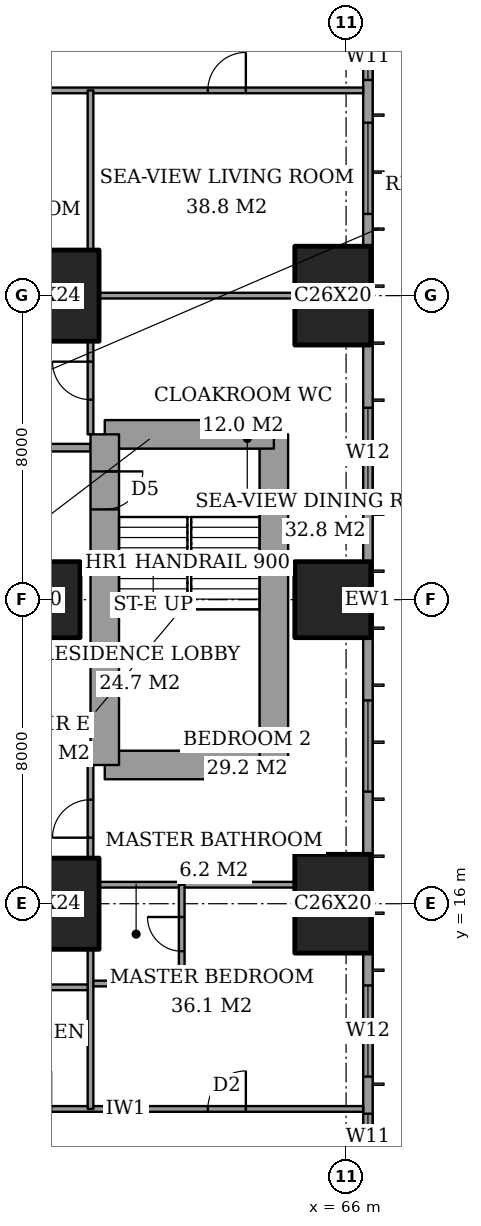
"""IFC4 building model, lengths in metres.
Left out: names, types, materials, properties, quantities, classifications, styles, units other than length and angle.
Written with IfcOpenShell. Run it as: python <this file> out.ifc"""

import sys

from ifc_helpers import new_model, si_unit, direction, frame, frame_2d, origin, origin_2d, place, context, subcontext, project, spatial, rectangle, extrude, element, fill, save


model = new_model("IFC4")
c1 = context("Model", 3, precision=1e-05, world=origin(), true_north=direction((0.0, 1.0)))
c2 = subcontext(c1, "Body", "Model", "MODEL_VIEW")
j1 = project(units=[si_unit("LENGTHUNIT", "METRE"), si_unit("PLANEANGLEUNIT", "RADIAN")], contexts=[c1])
p1 = place(None, origin())
s1 = spatial("IfcSite", under=j1, at=p1, CompositionType="ELEMENT")
p2 = place(p1, origin())
s2 = spatial("IfcBuilding", under=s1, at=p2, CompositionType="ELEMENT")
p3 = place(p2, frame((0.0, 0.0, 107.0)))
s3 = spatial("IfcBuildingStorey", under=s2, at=p3, CompositionType="ELEMENT", Elevation=107.0)
p4 = place(p3, frame((58.0, 16.0, 0.0), z_axis=(0.0, 0.0, 1.0), x_axis=(1.0, 0.0, 0.0)))
e1 = element("IfcColumn", 1, at=p4, inside=s3, PredefinedType="COLUMN", context=c2, shape_type="SweptSolid", body=[
    extrude(rectangle(XDim=3.0, YDim=2.4, at=origin_2d()), origin(), (0.0, 0.0, 1.0), 3.6),
])
p5 = place(p3, frame((58.0, 24.0, 0.0), z_axis=(0.0, 0.0, 1.0), x_axis=(1.0, 0.0, 0.0)))
e2 = element("IfcColumn", 2, at=p5, inside=s3, PredefinedType="COLUMN", context=c2, shape_type="SweptSolid", body=[
    extrude(rectangle(XDim=2.0, YDim=2.0, at=origin_2d()), origin(), (0.0, 0.0, 1.0), 3.6),
])
p6 = place(p3, frame((58.0, 32.0, 0.0), z_axis=(0.0, 0.0, 1.0), x_axis=(1.0, 0.0, 0.0)))
e3 = element("IfcColumn", 3, at=p6, inside=s3, PredefinedType="COLUMN", context=c2, shape_type="SweptSolid", body=[
    extrude(rectangle(XDim=3.0, YDim=2.4, at=origin_2d()), origin(), (0.0, 0.0, 1.0), 3.6),
])
p7 = place(p3, frame((65.65, 16.0, 0.0), z_axis=(0.0, 0.0, 1.0), x_axis=(0.0, 1.0, 0.0)))
e4 = element("IfcColumn", 4, at=p7, inside=s3, PredefinedType="COLUMN", context=c2, shape_type="SweptSolid", body=[
    extrude(rectangle(XDim=2.6, YDim=2.0, at=origin_2d()), origin(), (0.0, 0.0, 1.0), 3.6),
])
p8 = place(p3, frame((65.65, 24.0, 0.0), z_axis=(0.0, 0.0, 1.0), x_axis=(1.0, 0.0, 0.0)))
e5 = element("IfcColumn", 5, at=p8, inside=s3, PredefinedType="COLUMN", context=c2, shape_type="SweptSolid", body=[
    extrude(rectangle(XDim=2.0, YDim=2.0, at=origin_2d()), origin(), (0.0, 0.0, 1.0), 3.6),
])
p9 = place(p3, frame((65.65, 32.0, 0.0), z_axis=(0.0, 0.0, 1.0), x_axis=(0.0, 1.0, 0.0)))
e6 = element("IfcColumn", 6, at=p9, inside=s3, PredefinedType="COLUMN", context=c2, shape_type="SweptSolid", body=[
    extrude(rectangle(XDim=2.6, YDim=2.0, at=origin_2d()), origin(), (0.0, 0.0, 1.0), 3.6),
])
p10 = place(p3, frame((59.65, 19.65, 0.0), z_axis=(0.0, 0.0, 1.0), x_axis=(1.0, 0.0, 0.0)))
e7 = element("IfcWall", 7, at=p10, inside=s3, PredefinedType="SHEAR", context=c2, shape_type="SweptSolid", body=[
    extrude(rectangle(XDim=4.45, YDim=0.75, at=frame_2d((2.225, 0.0))), origin(), (0.0, 0.0, 1.0), 3.6),
])
p11 = place(p3, frame((64.1, 19.65, 0.0), z_axis=(0.0, 0.0, 1.0), x_axis=(0.0, 1.0, 0.0)))
e8 = element("IfcWall", 8, at=p11, inside=s3, PredefinedType="SHEAR", context=c2, shape_type="SweptSolid", body=[
    extrude(rectangle(XDim=8.7, YDim=0.75, at=frame_2d((4.35, 0.0))), origin(), (0.0, 0.0, 1.0), 3.6),
])
p12 = place(p3, frame((64.1, 28.35, 0.0), z_axis=(0.0, 0.0, 1.0), x_axis=(-1.0, 0.0, 0.0)))
e9 = element("IfcWall", 9, at=p12, inside=s3, PredefinedType="SHEAR", context=c2, shape_type="SweptSolid", body=[
    extrude(rectangle(XDim=4.45, YDim=0.75, at=frame_2d((2.225, 0.0))), origin(), (0.0, 0.0, 1.0), 3.6),
])
p13 = place(p3, frame((59.65, 28.35, 0.0), z_axis=(0.0, 0.0, 1.0), x_axis=(0.0, -1.0, 0.0)))
e10 = element("IfcWall", 10, at=p13, inside=s3, PredefinedType="SHEAR", context=c2, shape_type="SweptSolid", body=[
    extrude(rectangle(XDim=8.7, YDim=0.75, at=frame_2d((4.35, 0.0))), origin(), (0.0, 0.0, 1.0), 3.6),
])
p14 = place(p13, frame((0.975, 0.0, 0.0)))
e11 = element("IfcOpeningElement", 11, at=p14, cuts=e10, PredefinedType="OPENING", context=c2, shape_type="SweptSolid", body=[
    extrude(rectangle(XDim=1.0, YDim=2.1, at=frame_2d((0.5, 1.05))), frame((0.0, 0.385, 0.0), z_axis=(0.0, -1.0, 0.0), x_axis=(1.0, 0.0, 0.0)), (0.0, 0.0, 1.0), 0.77),
])
p15 = place(p3, frame((66.575, 3.175, 0.0), z_axis=(0.0, 0.0, 1.0), x_axis=(0.0, 1.0, 0.0)))
e12 = element("IfcWall", 12, at=p15, inside=s3, PredefinedType="SOLIDWALL", context=c2, shape_type="SweptSolid", body=[
    extrude(rectangle(XDim=41.65, YDim=0.25, at=frame_2d((20.825, 0.0))), origin(), (0.0, 0.0, 1.0), 3.6),
])
p16 = place(p15, frame((0.775, 0.0, 0.4)))
e13 = element("IfcOpeningElement", 13, at=p16, cuts=e12, PredefinedType="OPENING", context=c2, shape_type="SweptSolid", body=[
    extrude(rectangle(XDim=2.4, YDim=2.2, at=frame_2d((1.2, 1.1))), frame((0.0, 0.135, 0.0), z_axis=(0.0, -1.0, 0.0), x_axis=(1.0, 0.0, 0.0)), (0.0, 0.0, 1.0), 0.27),
])
p17 = place(p15, frame((6.1, 0.0, 0.4)))
e14 = element("IfcOpeningElement", 14, at=p17, cuts=e12, PredefinedType="OPENING", context=c2, shape_type="SweptSolid", body=[
    extrude(rectangle(XDim=1.2, YDim=2.2, at=frame_2d((0.6, 1.1))), frame((0.0, 0.135, 0.0), z_axis=(0.0, -1.0, 0.0), x_axis=(1.0, 0.0, 0.0)), (0.0, 0.0, 1.0), 0.27),
])
p18 = place(p15, frame((8.275, 0.0, 0.4)))
e15 = element("IfcOpeningElement", 15, at=p18, cuts=e12, PredefinedType="OPENING", context=c2, shape_type="SweptSolid", body=[
    extrude(rectangle(XDim=2.4, YDim=2.2, at=frame_2d((1.2, 1.1))), frame((0.0, 0.135, 0.0), z_axis=(0.0, -1.0, 0.0), x_axis=(1.0, 0.0, 0.0)), (0.0, 0.0, 1.0), 0.27),
])
p19 = place(p15, frame((15.775, 0.0, 0.4)))
e16 = element("IfcOpeningElement", 16, at=p19, cuts=e12, PredefinedType="OPENING", context=c2, shape_type="SweptSolid", body=[
    extrude(rectangle(XDim=2.4, YDim=2.2, at=frame_2d((1.2, 1.1))), frame((0.0, 0.135, 0.0), z_axis=(0.0, -1.0, 0.0), x_axis=(1.0, 0.0, 0.0)), (0.0, 0.0, 1.0), 0.27),
])
p20 = place(p15, frame((23.475, 0.0, 0.4)))
e17 = element("IfcOpeningElement", 17, at=p20, cuts=e12, PredefinedType="OPENING", context=c2, shape_type="SweptSolid", body=[
    extrude(rectangle(XDim=2.4, YDim=2.2, at=frame_2d((1.2, 1.1))), frame((0.0, 0.135, 0.0), z_axis=(0.0, -1.0, 0.0), x_axis=(1.0, 0.0, 0.0)), (0.0, 0.0, 1.0), 0.27),
])
p21 = place(p15, frame((30.975, 0.0, 0.4)))
e18 = element("IfcOpeningElement", 18, at=p21, cuts=e12, PredefinedType="OPENING", context=c2, shape_type="SweptSolid", body=[
    extrude(rectangle(XDim=2.4, YDim=2.2, at=frame_2d((1.2, 1.1))), frame((0.0, 0.135, 0.0), z_axis=(0.0, -1.0, 0.0), x_axis=(1.0, 0.0, 0.0)), (0.0, 0.0, 1.0), 0.27),
])
p22 = place(p15, frame((34.5, 0.0, 0.4)))
e19 = element("IfcOpeningElement", 19, at=p22, cuts=e12, PredefinedType="OPENING", context=c2, shape_type="SweptSolid", body=[
    extrude(rectangle(XDim=1.2, YDim=2.2, at=frame_2d((0.6, 1.1))), frame((0.0, 0.135, 0.0), z_axis=(0.0, -1.0, 0.0), x_axis=(1.0, 0.0, 0.0)), (0.0, 0.0, 1.0), 0.27),
])
p23 = place(p15, frame((38.475, 0.0, 0.4)))
e20 = element("IfcOpeningElement", 20, at=p23, cuts=e12, PredefinedType="OPENING", context=c2, shape_type="SweptSolid", body=[
    extrude(rectangle(XDim=2.4, YDim=2.2, at=frame_2d((1.2, 1.1))), frame((0.0, 0.135, 0.0), z_axis=(0.0, -1.0, 0.0), x_axis=(1.0, 0.0, 0.0)), (0.0, 0.0, 1.0), 0.27),
])
p24 = place(p3, frame((41.439, 10.6, 0.0), z_axis=(0.0, 0.0, 1.0), x_axis=(1.0, 0.0, 0.0)))
e21 = element("IfcWall", 21, at=p24, inside=s3, PredefinedType="PARTITIONING", context=c2, shape_type="SweptSolid", body=[
    extrude(rectangle(XDim=25.011, YDim=0.15, at=frame_2d((12.505, 0.0))), origin(), (0.0, 0.0, 1.0), 3.35),
])
p25 = place(p24, frame((10.761, 0.0, 0.0)))
e22 = element("IfcOpeningElement", 22, at=p25, cuts=e21, PredefinedType="OPENING", context=c2, shape_type="SweptSolid", body=[
    extrude(rectangle(XDim=1.0, YDim=2.1, at=frame_2d((0.5, 1.05))), frame((0.0, 0.085, 0.0), z_axis=(0.0, -1.0, 0.0), x_axis=(1.0, 0.0, 0.0)), (0.0, 0.0, 1.0), 0.17),
])
p26 = place(p24, frame((20.924, 0.0, 0.0)))
e23 = element("IfcOpeningElement", 23, at=p26, cuts=e21, PredefinedType="OPENING", context=c2, shape_type="SweptSolid", body=[
    extrude(rectangle(XDim=1.0, YDim=2.1, at=frame_2d((0.5, 1.05))), frame((0.0, 0.085, 0.0), z_axis=(0.0, -1.0, 0.0), x_axis=(1.0, 0.0, 0.0)), (0.0, 0.0, 1.0), 0.17),
])
p27 = place(p24, frame((15.799, 0.0, 0.0)))
e24 = element("IfcOpeningElement", 24, at=p27, cuts=e21, PredefinedType="OPENING", context=c2, shape_type="SweptSolid", body=[
    extrude(rectangle(XDim=1.0, YDim=2.1, at=frame_2d((0.5, 1.05))), frame((0.0, 0.085, 0.0), z_axis=(0.0, -1.0, 0.0), x_axis=(1.0, 0.0, 0.0)), (0.0, 0.0, 1.0), 0.17),
])
p28 = place(p24, frame((13.061, 0.0, 0.0)))
e25 = element("IfcOpeningElement", 25, at=p28, cuts=e21, PredefinedType="OPENING", context=c2, shape_type="SweptSolid", body=[
    extrude(rectangle(XDim=1.0, YDim=2.1, at=frame_2d((0.5, 1.05))), frame((0.0, 0.085, 0.0), z_axis=(0.0, -1.0, 0.0), x_axis=(1.0, 0.0, 0.0)), (0.0, 0.0, 1.0), 0.17),
])
p29 = place(p24, frame((7.911, 0.0, 0.0)))
e26 = element("IfcOpeningElement", 26, at=p29, cuts=e21, PredefinedType="OPENING", context=c2, shape_type="SweptSolid", body=[
    extrude(rectangle(XDim=0.9, YDim=2.1, at=frame_2d((0.45, 1.05))), frame((0.0, 0.085, 0.0), z_axis=(0.0, -1.0, 0.0), x_axis=(1.0, 0.0, 0.0)), (0.0, 0.0, 1.0), 0.17),
])
p30 = place(p24, frame((2.836, 0.0, 0.0)))
e27 = element("IfcOpeningElement", 27, at=p30, cuts=e21, PredefinedType="OPENING", context=c2, shape_type="SweptSolid", body=[
    extrude(rectangle(XDim=1.0, YDim=2.1, at=frame_2d((0.5, 1.05))), frame((0.0, 0.085, 0.0), z_axis=(0.0, -1.0, 0.0), x_axis=(1.0, 0.0, 0.0)), (0.0, 0.0, 1.0), 0.17),
])
p31 = place(p3, frame((56.2, 13.8, 0.0), z_axis=(0.0, 0.0, 1.0), x_axis=(1.0, 0.0, 0.0)))
e28 = element("IfcWall", 28, at=p31, inside=s3, PredefinedType="PARTITIONING", context=c2, shape_type="SweptSolid", body=[
    extrude(rectangle(XDim=3.075, YDim=0.15, at=frame_2d((1.538, 0.0))), origin(), (0.0, 0.0, 1.0), 3.35),
])
p32 = place(p3, frame((59.275, 13.9, 0.0), z_axis=(0.0, 0.0, 1.0), x_axis=(1.0, 0.0, 0.0)))
e29 = element("IfcWall", 29, at=p32, inside=s3, PredefinedType="PARTITIONING", context=c2, shape_type="SweptSolid", body=[
    extrude(rectangle(XDim=2.4, YDim=0.15, at=frame_2d((1.2, 0.0))), origin(), (0.0, 0.0, 1.0), 3.35),
])
p33 = place(p3, frame((59.5, 16.5, 0.0), z_axis=(0.0, 0.0, 1.0), x_axis=(1.0, 0.0, 0.0)))
e30 = element("IfcWall", 30, at=p33, inside=s3, PredefinedType="PARTITIONING", context=c2, shape_type="SweptSolid", body=[
    extrude(rectangle(XDim=5.15, YDim=0.15, at=frame_2d((2.575, 0.0))), origin(), (0.0, 0.0, 1.0), 3.35),
])
p34 = place(p3, frame((42.0, 28.0, 0.0), z_axis=(0.0, 0.0, 1.0), x_axis=(1.0, 0.0, 0.0)))
e31 = element("IfcWall", 31, at=p34, inside=s3, PredefinedType="PARTITIONING", context=c2, shape_type="SweptSolid", body=[
    extrude(rectangle(XDim=17.275, YDim=0.2, at=frame_2d((8.637, 0.0))), origin(), (0.0, 0.0, 1.0), 3.35),
])
p35 = place(p34, frame((9.4, 0.0, 0.0)))
e32 = element("IfcOpeningElement", 32, at=p35, cuts=e31, PredefinedType="OPENING", context=c2, shape_type="SweptSolid", body=[
    extrude(rectangle(XDim=1.2, YDim=2.4, at=frame_2d((0.6, 1.2))), frame((0.0, 0.11, 0.0), z_axis=(0.0, -1.0, 0.0), x_axis=(1.0, 0.0, 0.0)), (0.0, 0.0, 1.0), 0.22),
])
p36 = place(p3, frame((59.5, 32.0, 0.0), z_axis=(0.0, 0.0, 1.0), x_axis=(1.0, 0.0, 0.0)))
e33 = element("IfcWall", 33, at=p36, inside=s3, PredefinedType="PARTITIONING", context=c2, shape_type="SweptSolid", body=[
    extrude(rectangle(XDim=5.15, YDim=0.15, at=frame_2d((2.575, 0.0))), origin(), (0.0, 0.0, 1.0), 2.634),
])
p37 = place(p3, frame((41.439, 37.4, 0.0), z_axis=(0.0, 0.0, 1.0), x_axis=(1.0, 0.0, 0.0)))
e34 = element("IfcWall", 34, at=p37, inside=s3, PredefinedType="PARTITIONING", context=c2, shape_type="SweptSolid", body=[
    extrude(rectangle(XDim=25.011, YDim=0.15, at=frame_2d((12.505, 0.0))), origin(), (0.0, 0.0, 1.0), 3.35),
])
p38 = place(p37, frame((10.761, 0.0, 0.0)))
e35 = element("IfcOpeningElement", 35, at=p38, cuts=e34, PredefinedType="OPENING", context=c2, shape_type="SweptSolid", body=[
    extrude(rectangle(XDim=1.0, YDim=2.1, at=frame_2d((0.5, 1.05))), frame((0.0, 0.085, 0.0), z_axis=(0.0, -1.0, 0.0), x_axis=(1.0, 0.0, 0.0)), (0.0, 0.0, 1.0), 0.17),
])
p39 = place(p37, frame((20.924, 0.0, 0.0)))
e36 = element("IfcOpeningElement", 36, at=p39, cuts=e34, PredefinedType="OPENING", context=c2, shape_type="SweptSolid", body=[
    extrude(rectangle(XDim=1.0, YDim=2.1, at=frame_2d((0.5, 1.05))), frame((0.0, 0.085, 0.0), z_axis=(0.0, -1.0, 0.0), x_axis=(1.0, 0.0, 0.0)), (0.0, 0.0, 1.0), 0.17),
])
p40 = place(p37, frame((15.749, 0.0, 0.0)))
e37 = element("IfcOpeningElement", 37, at=p40, cuts=e34, PredefinedType="OPENING", context=c2, shape_type="SweptSolid", body=[
    extrude(rectangle(XDim=0.9, YDim=2.1, at=frame_2d((0.45, 1.05))), frame((0.0, 0.085, 0.0), z_axis=(0.0, -1.0, 0.0), x_axis=(1.0, 0.0, 0.0)), (0.0, 0.0, 1.0), 0.17),
])
p41 = place(p37, frame((12.961, 0.0, 0.0)))
e38 = element("IfcOpeningElement", 38, at=p41, cuts=e34, PredefinedType="OPENING", context=c2, shape_type="SweptSolid", body=[
    extrude(rectangle(XDim=1.0, YDim=2.1, at=frame_2d((0.5, 1.05))), frame((0.0, 0.085, 0.0), z_axis=(0.0, -1.0, 0.0), x_axis=(1.0, 0.0, 0.0)), (0.0, 0.0, 1.0), 0.17),
])
p42 = place(p37, frame((7.861, 0.0, 0.0)))
e39 = element("IfcOpeningElement", 39, at=p42, cuts=e34, PredefinedType="OPENING", context=c2, shape_type="SweptSolid", body=[
    extrude(rectangle(XDim=1.0, YDim=2.1, at=frame_2d((0.5, 1.05))), frame((0.0, 0.085, 0.0), z_axis=(0.0, -1.0, 0.0), x_axis=(1.0, 0.0, 0.0)), (0.0, 0.0, 1.0), 0.17),
])
p43 = place(p37, frame((2.836, 0.0, 0.0)))
e40 = element("IfcOpeningElement", 40, at=p43, cuts=e34, PredefinedType="OPENING", context=c2, shape_type="SweptSolid", body=[
    extrude(rectangle(XDim=1.0, YDim=2.1, at=frame_2d((0.5, 1.05))), frame((0.0, 0.085, 0.0), z_axis=(0.0, -1.0, 0.0), x_axis=(1.0, 0.0, 0.0)), (0.0, 0.0, 1.0), 0.17),
])
p44 = place(p3, frame((59.275, 10.6, 0.0), z_axis=(0.0, 0.0, 1.0), x_axis=(0.0, 1.0, 0.0)))
e41 = element("IfcWall", 41, at=p44, inside=s3, PredefinedType="PARTITIONING", context=c2, shape_type="SweptSolid", body=[
    extrude(rectangle(XDim=4.2, YDim=0.15, at=frame_2d((2.1, 0.0))), origin(), (0.0, 0.0, 1.0), 3.35),
])
p45 = place(p3, frame((59.275, 17.2, 0.0), z_axis=(0.0, 0.0, 1.0), x_axis=(0.0, 1.0, 0.0)))
e42 = element("IfcWall", 42, at=p45, inside=s3, PredefinedType="PARTITIONING", context=c2, shape_type="SweptSolid", body=[
    extrude(rectangle(XDim=2.45, YDim=0.15, at=frame_2d((1.225, 0.0))), origin(), (0.0, 0.0, 1.0), 3.35),
])
p46 = place(p45, frame((0.538, 0.0, 0.0)))
e43 = element("IfcOpeningElement", 43, at=p46, cuts=e42, PredefinedType="OPENING", context=c2, shape_type="SweptSolid", body=[
    extrude(rectangle(XDim=1.0, YDim=2.1, at=frame_2d((0.5, 1.05))), frame((0.0, 0.085, 0.0), z_axis=(0.0, -1.0, 0.0), x_axis=(1.0, 0.0, 0.0)), (0.0, 0.0, 1.0), 0.17),
])
p47 = place(p3, frame((59.275, 28.35, 0.0), z_axis=(0.0, 0.0, 1.0), x_axis=(0.0, 1.0, 0.0)))
e44 = element("IfcWall", 44, at=p47, inside=s3, PredefinedType="PARTITIONING", context=c2, shape_type="SweptSolid", body=[
    extrude(rectangle(XDim=2.45, YDim=0.15, at=frame_2d((1.225, 0.0))), origin(), (0.0, 0.0, 1.0), 3.35),
])
p48 = place(p47, frame((0.913, 0.0, 0.0)))
e45 = element("IfcOpeningElement", 45, at=p48, cuts=e44, PredefinedType="OPENING", context=c2, shape_type="SweptSolid", body=[
    extrude(rectangle(XDim=1.0, YDim=2.1, at=frame_2d((0.5, 1.05))), frame((0.0, 0.085, 0.0), z_axis=(0.0, -1.0, 0.0), x_axis=(1.0, 0.0, 0.0)), (0.0, 0.0, 1.0), 0.17),
])
p49 = place(p3, frame((59.275, 33.2, 0.0), z_axis=(0.0, 0.0, 1.0), x_axis=(0.0, 1.0, 0.0)))
e46 = element("IfcWall", 46, at=p49, inside=s3, PredefinedType="PARTITIONING", context=c2, shape_type="SweptSolid", body=[
    extrude(rectangle(XDim=4.2, YDim=0.15, at=frame_2d((2.1, 0.0))), origin(), (0.0, 0.0, 1.0), 3.35),
])
p50 = place(p3, frame((61.675, 13.9, 0.0), z_axis=(0.0, 0.0, 1.0), x_axis=(0.0, 1.0, 0.0)))
e47 = element("IfcWall", 47, at=p50, inside=s3, PredefinedType="PARTITIONING", context=c2, shape_type="SweptSolid", body=[
    extrude(rectangle(XDim=2.6, YDim=0.15, at=frame_2d((1.3, 0.0))), origin(), (0.0, 0.0, 1.0), 3.35),
])
p51 = place(p50, frame((0.85, 0.0, 0.0)))
e48 = element("IfcOpeningElement", 48, at=p51, cuts=e47, PredefinedType="OPENING", context=c2, shape_type="SweptSolid", body=[
    extrude(rectangle(XDim=0.9, YDim=2.1, at=frame_2d((0.45, 1.05))), frame((0.0, 0.085, 0.0), z_axis=(0.0, -1.0, 0.0), x_axis=(1.0, 0.0, 0.0)), (0.0, 0.0, 1.0), 0.17),
])
p52 = place(p17, origin())
e49 = element("IfcWindow", 49, at=p52, inside=s3, PartitioningType="SINGLE_PANEL", PredefinedType="WINDOW", context=c2, shape_type="SweptSolid", body=[
    extrude(rectangle(XDim=1.2, YDim=2.2, at=frame_2d((0.6, 1.1))), frame((0.0, 0.03, 0.0), z_axis=(0.0, -1.0, 0.0), x_axis=(1.0, 0.0, 0.0)), (0.0, 0.0, 1.0), 0.06),
])
fill(e14, e49)
p53 = place(p18, origin())
e50 = element("IfcWindow", 50, at=p53, inside=s3, PartitioningType="SINGLE_PANEL", PredefinedType="WINDOW", context=c2, shape_type="SweptSolid", body=[
    extrude(rectangle(XDim=2.4, YDim=2.2, at=frame_2d((1.2, 1.1))), frame((0.0, 0.03, 0.0), z_axis=(0.0, -1.0, 0.0), x_axis=(1.0, 0.0, 0.0)), (0.0, 0.0, 1.0), 0.06),
])
fill(e15, e50)
p54 = place(p19, origin())
e51 = element("IfcWindow", 51, at=p54, inside=s3, PartitioningType="SINGLE_PANEL", PredefinedType="WINDOW", context=c2, shape_type="SweptSolid", body=[
    extrude(rectangle(XDim=2.4, YDim=2.2, at=frame_2d((1.2, 1.1))), frame((0.0, 0.03, 0.0), z_axis=(0.0, -1.0, 0.0), x_axis=(1.0, 0.0, 0.0)), (0.0, 0.0, 1.0), 0.06),
])
fill(e16, e51)
p55 = place(p20, origin())
e52 = element("IfcWindow", 52, at=p55, inside=s3, PartitioningType="SINGLE_PANEL", PredefinedType="WINDOW", context=c2, shape_type="SweptSolid", body=[
    extrude(rectangle(XDim=2.4, YDim=2.2, at=frame_2d((1.2, 1.1))), frame((0.0, 0.03, 0.0), z_axis=(0.0, -1.0, 0.0), x_axis=(1.0, 0.0, 0.0)), (0.0, 0.0, 1.0), 0.06),
])
fill(e17, e52)
p56 = place(p21, origin())
e53 = element("IfcWindow", 53, at=p56, inside=s3, PartitioningType="SINGLE_PANEL", PredefinedType="WINDOW", context=c2, shape_type="SweptSolid", body=[
    extrude(rectangle(XDim=2.4, YDim=2.2, at=frame_2d((1.2, 1.1))), frame((0.0, 0.03, 0.0), z_axis=(0.0, -1.0, 0.0), x_axis=(1.0, 0.0, 0.0)), (0.0, 0.0, 1.0), 0.06),
])
fill(e18, e53)
p57 = place(p22, origin())
e54 = element("IfcWindow", 54, at=p57, inside=s3, PartitioningType="SINGLE_PANEL", PredefinedType="WINDOW", context=c2, shape_type="SweptSolid", body=[
    extrude(rectangle(XDim=1.2, YDim=2.2, at=frame_2d((0.6, 1.1))), frame((0.0, 0.03, 0.0), z_axis=(0.0, -1.0, 0.0), x_axis=(1.0, 0.0, 0.0)), (0.0, 0.0, 1.0), 0.06),
])
fill(e19, e54)
p58 = place(p51, origin())
e55 = element("IfcDoor", 55, at=p58, inside=s3, OperationType="SINGLE_SWING_LEFT", PredefinedType="DOOR", context=c2, shape_type="SweptSolid", body=[
    extrude(rectangle(XDim=0.9, YDim=2.1, at=frame_2d((0.45, 1.05))), frame((0.0, 0.025, 0.0), z_axis=(0.0, -1.0, 0.0), x_axis=(1.0, 0.0, 0.0)), (0.0, 0.0, 1.0), 0.05),
])
fill(e48, e55)
p59 = place(p26, origin())
e56 = element("IfcDoor", 56, at=p59, inside=s3, OperationType="SINGLE_SWING_LEFT", PredefinedType="DOOR", context=c2, shape_type="SweptSolid", body=[
    extrude(rectangle(XDim=1.0, YDim=2.1, at=frame_2d((0.5, 1.05))), frame((0.0, 0.025, 0.0), z_axis=(0.0, -1.0, 0.0), x_axis=(1.0, 0.0, 0.0)), (0.0, 0.0, 1.0), 0.05),
])
fill(e23, e56)
p60 = place(p46, origin())
e57 = element("IfcDoor", 57, at=p60, inside=s3, OperationType="SINGLE_SWING_RIGHT", PredefinedType="DOOR", context=c2, shape_type="SweptSolid", body=[
    extrude(rectangle(XDim=1.0, YDim=2.1, at=frame_2d((0.5, 1.05))), frame((0.0, 0.025, 0.0), z_axis=(0.0, -1.0, 0.0), x_axis=(1.0, 0.0, 0.0)), (0.0, 0.0, 1.0), 0.05),
])
fill(e43, e57)
p61 = place(p39, origin())
e58 = element("IfcDoor", 58, at=p61, inside=s3, OperationType="SINGLE_SWING_LEFT", PredefinedType="DOOR", context=c2, shape_type="SweptSolid", body=[
    extrude(rectangle(XDim=1.0, YDim=2.1, at=frame_2d((0.5, 1.05))), frame((0.0, 0.025, 0.0), z_axis=(0.0, -1.0, 0.0), x_axis=(1.0, 0.0, 0.0)), (0.0, 0.0, 1.0), 0.05),
])
fill(e36, e58)
p62 = place(p48, origin())
e59 = element("IfcDoor", 59, at=p62, inside=s3, OperationType="SINGLE_SWING_LEFT", PredefinedType="DOOR", context=c2, shape_type="SweptSolid", body=[
    extrude(rectangle(XDim=1.0, YDim=2.1, at=frame_2d((0.5, 1.05))), frame((0.0, 0.025, 0.0), z_axis=(0.0, -1.0, 0.0), x_axis=(1.0, 0.0, 0.0)), (0.0, 0.0, 1.0), 0.05),
])
fill(e45, e59)
p63 = place(p14, origin())
e60 = element("IfcDoor", 60, at=p63, inside=s3, OperationType="SINGLE_SWING_RIGHT", PredefinedType="DOOR", context=c2, shape_type="SweptSolid", body=[
    extrude(rectangle(XDim=1.0, YDim=2.1, at=frame_2d((0.5, 1.05))), frame((0.0, 0.025, 0.0), z_axis=(0.0, -1.0, 0.0), x_axis=(1.0, 0.0, 0.0)), (0.0, 0.0, 1.0), 0.05),
])
fill(e11, e60)
save(model, sys.argv[1])
